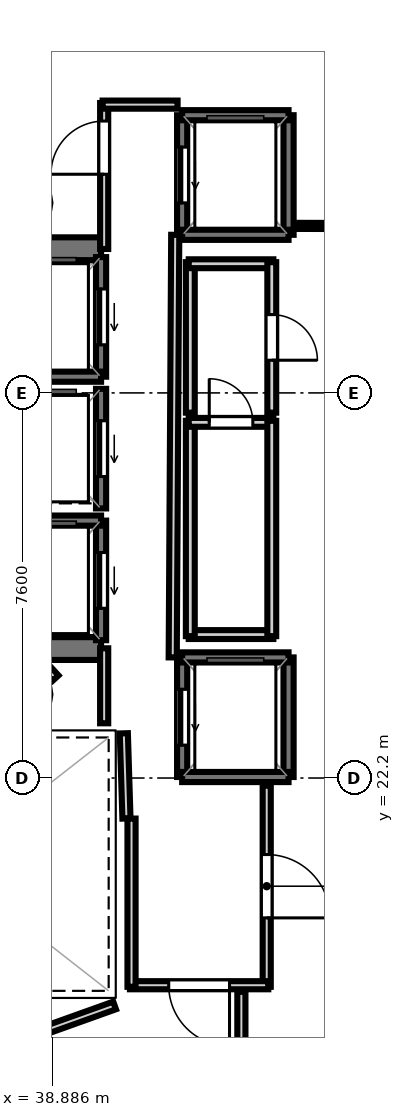
"""IFC4 building model, lengths in metres.
Left out: names, types, materials, properties, quantities, classifications, styles, units other than length and angle.
Written with IfcOpenShell. Run it as: python <this file> out.ifc"""

import sys

from ifc_helpers import new_model, si_unit, direction, frame, frame_2d, origin, place, context, subcontext, project, spatial, rectangle, extrude, element, fill, save


model = new_model("IFC4")
c1 = context("Model", 3, precision=1e-05, world=origin(), true_north=direction((0.0, 1.0)))
c2 = subcontext(c1, "Body", "Model", "MODEL_VIEW")
j1 = project(units=[si_unit("LENGTHUNIT", "METRE"), si_unit("PLANEANGLEUNIT", "RADIAN")], contexts=[c1])
p1 = place(None, origin())
s1 = spatial("IfcSite", under=j1, at=p1, CompositionType="ELEMENT")
p2 = place(p1, origin())
s2 = spatial("IfcBuilding", under=s1, at=p2, CompositionType="ELEMENT")
p3 = place(p2, frame((0.0, 0.0, 317.6)))
s3 = spatial("IfcBuildingStorey", under=s2, at=p3, CompositionType="ELEMENT", Elevation=317.6)
p4 = place(p3, frame((29.33, 32.645, 0.0), z_axis=(0.0, 0.0, 1.0), x_axis=(1.0, 0.0, 0.0)))
e1 = element("IfcWall", 1, at=p4, inside=s3, PredefinedType="SHEAR", context=c2, shape_type="SweptSolid", body=[
    extrude(rectangle(XDim=10.52, YDim=0.45, at=frame_2d((5.26, 0.0))), origin(), (0.0, 0.0, 1.0), 3.4),
])
p5 = place(p4, frame((0.895, 0.0, 0.0)))
e2 = element("IfcOpeningElement", 2, at=p5, cuts=e1, PredefinedType="OPENING", context=c2, shape_type="SweptSolid", body=[
    extrude(rectangle(XDim=1.25, YDim=2.15, at=frame_2d((0.625, 1.075))), frame((0.0, 0.235, 0.0), z_axis=(0.0, -1.0, 0.0), x_axis=(1.0, 0.0, 0.0)), (0.0, 0.0, 1.0), 0.47),
])
p6 = place(p3, frame((29.33, 24.755, 0.0), z_axis=(0.0, 0.0, 1.0), x_axis=(1.0, 0.0, 0.0)))
e3 = element("IfcWall", 3, at=p6, inside=s3, PredefinedType="SHEAR", context=c2, shape_type="SweptSolid", body=[
    extrude(rectangle(XDim=10.52, YDim=0.45, at=frame_2d((5.26, 0.0))), origin(), (0.0, 0.0, 1.0), 3.4),
])
p7 = place(p6, frame((0.695, 0.0, 0.0)))
e4 = element("IfcOpeningElement", 4, at=p7, cuts=e3, PredefinedType="OPENING", context=c2, shape_type="SweptSolid", body=[
    extrude(rectangle(XDim=1.25, YDim=2.15, at=frame_2d((0.625, 1.075))), frame((0.0, 0.235, 0.0), z_axis=(0.0, -1.0, 0.0), x_axis=(1.0, 0.0, 0.0)), (0.0, 0.0, 1.0), 0.47),
])
p8 = place(p3, frame((39.85, 30.12, 0.0), z_axis=(0.0, 0.0, 1.0), x_axis=(0.0, 1.0, 0.0)))
e5 = element("IfcWall", 5, at=p8, inside=s3, PredefinedType="SOLIDWALL", context=c2, shape_type="SweptSolid", body=[
    extrude(rectangle(XDim=2.36, YDim=0.2, at=frame_2d((1.18, 0.0))), origin(), (0.0, 0.0, 1.0), 3.4),
])
p9 = place(p8, frame((0.63, 0.0, 0.0)))
e6 = element("IfcOpeningElement", 6, at=p9, cuts=e5, PredefinedType="OPENING", context=c2, shape_type="SweptSolid", body=[
    extrude(rectangle(XDim=1.1, YDim=2.15, at=frame_2d((0.55, 1.075))), frame((0.0, 0.11, 0.0), z_axis=(0.0, -1.0, 0.0), x_axis=(1.0, 0.0, 0.0)), (0.0, 0.0, 1.0), 0.22),
])
p10 = place(p3, frame((37.75, 30.12, 0.0), z_axis=(0.0, 0.0, 1.0), x_axis=(1.0, 0.0, 0.0)))
e7 = element("IfcWall", 7, at=p10, inside=s3, PredefinedType="SOLIDWALL", context=c2, shape_type="SweptSolid", body=[
    extrude(rectangle(XDim=2.1, YDim=0.2, at=frame_2d((1.05, 0.0))), origin(), (0.0, 0.0, 1.0), 3.4),
])
p11 = place(p3, frame((39.85, 24.92, 0.0), z_axis=(0.0, 0.0, 1.0), x_axis=(0.0, 1.0, 0.0)))
e8 = element("IfcWall", 8, at=p11, inside=s3, PredefinedType="SOLIDWALL", context=c2, shape_type="SweptSolid", body=[
    extrude(rectangle(XDim=2.36, YDim=0.2, at=frame_2d((1.18, 0.0))), origin(), (0.0, 0.0, 1.0), 3.4),
])
p12 = place(p11, frame((0.63, 0.0, 0.0)))
e9 = element("IfcOpeningElement", 9, at=p12, cuts=e8, PredefinedType="OPENING", context=c2, shape_type="SweptSolid", body=[
    extrude(rectangle(XDim=1.1, YDim=2.15, at=frame_2d((0.55, 1.075))), frame((0.0, 0.11, 0.0), z_axis=(0.0, -1.0, 0.0), x_axis=(1.0, 0.0, 0.0)), (0.0, 0.0, 1.0), 0.22),
])
p13 = place(p3, frame((37.75, 27.28, 0.0), z_axis=(0.0, 0.0, 1.0), x_axis=(1.0, 0.0, 0.0)))
e10 = element("IfcWall", 10, at=p13, inside=s3, PredefinedType="SOLIDWALL", context=c2, shape_type="SweptSolid", body=[
    extrude(rectangle(XDim=2.1, YDim=0.2, at=frame_2d((1.05, 0.0))), origin(), (0.0, 0.0, 1.0), 3.4),
])
p14 = place(p3, frame((39.85, 27.52, 0.0), z_axis=(0.0, 0.0, 1.0), x_axis=(0.0, 1.0, 0.0)))
e11 = element("IfcWall", 11, at=p14, inside=s3, PredefinedType="SOLIDWALL", context=c2, shape_type="SweptSolid", body=[
    extrude(rectangle(XDim=2.36, YDim=0.2, at=frame_2d((1.18, 0.0))), origin(), (0.0, 0.0, 1.0), 3.4),
])
p15 = place(p14, frame((0.63, 0.0, 0.0)))
e12 = element("IfcOpeningElement", 12, at=p15, cuts=e11, PredefinedType="OPENING", context=c2, shape_type="SweptSolid", body=[
    extrude(rectangle(XDim=1.1, YDim=2.15, at=frame_2d((0.55, 1.075))), frame((0.0, 0.11, 0.0), z_axis=(0.0, -1.0, 0.0), x_axis=(1.0, 0.0, 0.0)), (0.0, 0.0, 1.0), 0.22),
])
p16 = place(p3, frame((43.55, 22.22, 0.0), z_axis=(0.0, 0.0, 1.0), x_axis=(0.0, 1.0, 0.0)))
e13 = element("IfcWall", 13, at=p16, inside=s3, PredefinedType="SOLIDWALL", context=c2, shape_type="SweptSolid", body=[
    extrude(rectangle(XDim=2.36, YDim=0.2, at=frame_2d((1.18, 0.0))), origin(), (0.0, 0.0, 1.0), 3.4),
])
p17 = place(p3, frame((41.45, 22.22, 0.0), z_axis=(0.0, 0.0, 1.0), x_axis=(0.0, 1.0, 0.0)))
e14 = element("IfcWall", 14, at=p17, inside=s3, PredefinedType="SOLIDWALL", context=c2, shape_type="SweptSolid", body=[
    extrude(rectangle(XDim=2.36, YDim=0.2, at=frame_2d((1.18, 0.0))), origin(), (0.0, 0.0, 1.0), 3.4),
])
p18 = place(p17, frame((0.63, 0.0, 0.0)))
e15 = element("IfcOpeningElement", 15, at=p18, cuts=e14, PredefinedType="OPENING", context=c2, shape_type="SweptSolid", body=[
    extrude(rectangle(XDim=1.1, YDim=2.15, at=frame_2d((0.55, 1.075))), frame((0.0, 0.11, 0.0), z_axis=(0.0, -1.0, 0.0), x_axis=(1.0, 0.0, 0.0)), (0.0, 0.0, 1.0), 0.22),
])
for number, where, z_axis, x_axis in (
    (16, (41.45, 24.58, 0.0), (0.0, 0.0, 1.0), (1.0, 0.0, 0.0)),
    (17, (41.45, 22.22, 0.0), (0.0, 0.0, 1.0), (1.0, 0.0, 0.0)),
):
    element("IfcWall", number, at=place(p3, frame(where, z_axis=z_axis, x_axis=x_axis)), inside=s3, PredefinedType="SOLIDWALL", context=c2, shape_type="SweptSolid", body=[
        extrude(rectangle(XDim=2.1, YDim=0.2, at=frame_2d((1.05, 0.0))), origin(), (0.0, 0.0, 1.0), 3.4),
    ])
p19 = place(p3, frame((43.55, 32.92, 0.0), z_axis=(0.0, 0.0, 1.0), x_axis=(0.0, 1.0, 0.0)))
e18 = element("IfcWall", 18, at=p19, inside=s3, PredefinedType="SOLIDWALL", context=c2, shape_type="SweptSolid", body=[
    extrude(rectangle(XDim=2.36, YDim=0.2, at=frame_2d((1.18, 0.0))), origin(), (0.0, 0.0, 1.0), 3.4),
])
p20 = place(p3, frame((41.45, 32.92, 0.0), z_axis=(0.0, 0.0, 1.0), x_axis=(0.0, 1.0, 0.0)))
e19 = element("IfcWall", 19, at=p20, inside=s3, PredefinedType="SOLIDWALL", context=c2, shape_type="SweptSolid", body=[
    extrude(rectangle(XDim=2.36, YDim=0.2, at=frame_2d((1.18, 0.0))), origin(), (0.0, 0.0, 1.0), 3.4),
])
p21 = place(p20, frame((0.63, 0.0, 0.0)))
e20 = element("IfcOpeningElement", 20, at=p21, cuts=e19, PredefinedType="OPENING", context=c2, shape_type="SweptSolid", body=[
    extrude(rectangle(XDim=1.1, YDim=2.15, at=frame_2d((0.55, 1.075))), frame((0.0, 0.11, 0.0), z_axis=(0.0, -1.0, 0.0), x_axis=(1.0, 0.0, 0.0)), (0.0, 0.0, 1.0), 0.22),
])
for number, where, z_axis, x_axis in (
    (21, (41.45, 35.28, 0.0), (0.0, 0.0, 1.0), (1.0, 0.0, 0.0)),
    (22, (41.45, 32.92, 0.0), (0.0, 0.0, 1.0), (1.0, 0.0, 0.0)),
):
    element("IfcWall", number, at=place(p3, frame(where, z_axis=z_axis, x_axis=x_axis)), inside=s3, PredefinedType="SOLIDWALL", context=c2, shape_type="SweptSolid", body=[
        extrude(rectangle(XDim=2.1, YDim=0.2, at=frame_2d((1.05, 0.0))), origin(), (0.0, 0.0, 1.0), 3.4),
    ])
p22 = place(p3, frame((40.351, 21.401, 0.0), z_axis=(0.0, 0.0, 1.0), x_axis=(-0.031058045979, 0.999517582527, 0.0)))
e23 = element("IfcWall", 23, at=p22, inside=s3, PredefinedType="PARTITIONING", context=c2, shape_type="SweptSolid", body=[
    extrude(rectangle(XDim=1.682, YDim=0.16, at=frame_2d((0.841, 0.0))), origin(), (0.0, 0.0, 1.0), 2.72),
])
p23 = place(p3, frame((39.911, 23.28, 0.0), z_axis=(0.0, 0.0, 1.0), x_axis=(0.0, 1.0, 0.0)))
e24 = element("IfcWall", 24, at=p23, inside=s3, PredefinedType="PARTITIONING", context=c2, shape_type="SweptSolid", body=[
    extrude(rectangle(XDim=1.48, YDim=0.16, at=frame_2d((0.74, 0.0))), origin(), (0.0, 0.0, 1.0), 2.72),
])
p24 = place(p3, frame((39.911, 32.64, 0.0), z_axis=(0.0, 0.0, 1.0), x_axis=(0.0, 1.0, 0.0)))
e25 = element("IfcWall", 25, at=p24, inside=s3, PredefinedType="PARTITIONING", context=c2, shape_type="SweptSolid", body=[
    extrude(rectangle(XDim=2.88, YDim=0.16, at=frame_2d((1.44, 0.0))), origin(), (0.0, 0.0, 1.0), 2.72),
])
p25 = place(p24, frame((1.475, 0.0, 0.0)))
e26 = element("IfcOpeningElement", 26, at=p25, cuts=e25, PredefinedType="OPENING", context=c2, shape_type="SweptSolid", body=[
    extrude(rectangle(XDim=1.05, YDim=2.15, at=frame_2d((0.525, 1.075))), frame((0.0, 0.09, 0.0), z_axis=(0.0, -1.0, 0.0), x_axis=(1.0, 0.0, 0.0)), (0.0, 0.0, 1.0), 0.18),
])
p26 = place(p3, frame((39.88, 35.489, 0.0), z_axis=(0.0, 0.0, 1.0), x_axis=(1.0, 0.0, 0.0)))
e27 = element("IfcWall", 27, at=p26, inside=s3, PredefinedType="PARTITIONING", context=c2, shape_type="SweptSolid", body=[
    extrude(rectangle(XDim=1.48, YDim=0.16, at=frame_2d((0.74, 0.0))), origin(), (0.0, 0.0, 1.0), 2.72),
])
p27 = place(p3, frame((41.313, 32.92, 0.0), z_axis=(0.0, 0.0, 1.0), x_axis=(-0.005942518022, -0.999982343084, 0.0)))
e28 = element("IfcWall", 28, at=p27, inside=s3, PredefinedType="PARTITIONING", context=c2, shape_type="SweptSolid", body=[
    extrude(rectangle(XDim=8.34, YDim=0.16, at=frame_2d((4.17, 0.0))), origin(), (0.0, 0.0, 1.0), 2.72),
])
p28 = place(p3, frame((43.119, 22.05, 0.0), z_axis=(0.0, 0.0, 1.0), x_axis=(0.0, -1.0, 0.0)))
e29 = element("IfcWall", 29, at=p28, inside=s3, PredefinedType="PARTITIONING", context=c2, shape_type="SweptSolid", body=[
    extrude(rectangle(XDim=3.97, YDim=0.16, at=frame_2d((1.985, 0.0))), origin(), (0.0, 0.0, 1.0), 2.72),
])
p29 = place(p28, frame((1.36, 0.0, 0.0)))
e30 = element("IfcOpeningElement", 30, at=p29, cuts=e29, PredefinedType="OPENING", context=c2, shape_type="SweptSolid", body=[
    extrude(rectangle(XDim=1.25, YDim=2.2, at=frame_2d((0.625, 1.1))), frame((0.0, 0.09, 0.0), z_axis=(0.0, -1.0, 0.0), x_axis=(1.0, 0.0, 0.0)), (0.0, 0.0, 1.0), 0.18),
])
p30 = place(p3, frame((43.15, 18.111, 0.0), z_axis=(0.0, 0.0, 1.0), x_axis=(-1.0, 0.0, 0.0)))
e31 = element("IfcWall", 31, at=p30, inside=s3, PredefinedType="PARTITIONING", context=c2, shape_type="SweptSolid", body=[
    extrude(rectangle(XDim=2.73, YDim=0.16, at=frame_2d((1.365, 0.0))), origin(), (0.0, 0.0, 1.0), 2.72),
])
p31 = place(p30, frame((0.765, 0.0, 0.0)))
e32 = element("IfcOpeningElement", 32, at=p31, cuts=e31, PredefinedType="OPENING", context=c2, shape_type="SweptSolid", body=[
    extrude(rectangle(XDim=1.2, YDim=2.15, at=frame_2d((0.6, 1.075))), frame((0.0, 0.09, 0.0), z_axis=(0.0, -1.0, 0.0), x_axis=(1.0, 0.0, 0.0)), (0.0, 0.0, 1.0), 0.18),
])
p32 = place(p3, frame((40.451, 18.08, 0.0), z_axis=(0.0, 0.0, 1.0), x_axis=(0.0, 1.0, 0.0)))
e33 = element("IfcWall", 33, at=p32, inside=s3, PredefinedType="PARTITIONING", context=c2, shape_type="SweptSolid", body=[
    extrude(rectangle(XDim=3.32, YDim=0.16, at=frame_2d((1.66, 0.0))), origin(), (0.0, 0.0, 1.0), 2.72),
])
p33 = place(p3, frame((43.25, 25.031, 0.0), z_axis=(0.0, 0.0, 1.0), x_axis=(-1.0, 0.0, 0.0)))
e34 = element("IfcWall", 34, at=p33, inside=s3, PredefinedType="PLUMBINGWALL", context=c2, shape_type="SweptSolid", body=[
    extrude(rectangle(XDim=1.67, YDim=0.175, at=frame_2d((0.835, 0.0))), origin(), (0.0, 0.0, 1.0), 2.72),
])
p34 = place(p3, frame((41.611, 25.0, 0.0), z_axis=(0.0, 0.0, 1.0), x_axis=(0.0, 1.0, 0.0)))
e35 = element("IfcWall", 35, at=p34, inside=s3, PredefinedType="PLUMBINGWALL", context=c2, shape_type="SweptSolid", body=[
    extrude(rectangle(XDim=4.25, YDim=0.175, at=frame_2d((2.125, 0.0))), origin(), (0.0, 0.0, 1.0), 2.72),
])
p35 = place(p3, frame((41.58, 29.219, 0.0), z_axis=(0.0, 0.0, 1.0), x_axis=(1.0, 0.0, 0.0)))
e36 = element("IfcWall", 36, at=p35, inside=s3, PredefinedType="PLUMBINGWALL", context=c2, shape_type="SweptSolid", body=[
    extrude(rectangle(XDim=1.67, YDim=0.175, at=frame_2d((0.835, 0.0))), origin(), (0.0, 0.0, 1.0), 2.72),
])
p36 = place(p35, frame((0.405, 0.0, 0.0)))
e37 = element("IfcOpeningElement", 37, at=p36, cuts=e36, PredefinedType="OPENING", context=c2, shape_type="SweptSolid", body=[
    extrude(rectangle(XDim=0.86, YDim=2.05, at=frame_2d((0.43, 1.025))), frame((0.0, 0.097, 0.0), z_axis=(0.0, -1.0, 0.0), x_axis=(1.0, 0.0, 0.0)), (0.0, 0.0, 1.0), 0.195),
])
p37 = place(p3, frame((43.219, 29.25, 0.0), z_axis=(0.0, 0.0, 1.0), x_axis=(0.0, -1.0, 0.0)))
e38 = element("IfcWall", 38, at=p37, inside=s3, PredefinedType="PLUMBINGWALL", context=c2, shape_type="SweptSolid", body=[
    extrude(rectangle(XDim=4.25, YDim=0.175, at=frame_2d((2.125, 0.0))), origin(), (0.0, 0.0, 1.0), 2.72),
])
p38 = place(p3, frame((41.611, 29.41, 0.0), z_axis=(0.0, 0.0, 1.0), x_axis=(0.0, 1.0, 0.0)))
e39 = element("IfcWall", 39, at=p38, inside=s3, PredefinedType="PLUMBINGWALL", context=c2, shape_type="SweptSolid", body=[
    extrude(rectangle(XDim=2.97, YDim=0.175, at=frame_2d((1.485, 0.0))), origin(), (0.0, 0.0, 1.0), 2.72),
])
p39 = place(p3, frame((41.58, 32.349, 0.0), z_axis=(0.0, 0.0, 1.0), x_axis=(1.0, 0.0, 0.0)))
e40 = element("IfcWall", 40, at=p39, inside=s3, PredefinedType="PLUMBINGWALL", context=c2, shape_type="SweptSolid", body=[
    extrude(rectangle(XDim=1.67, YDim=0.175, at=frame_2d((0.835, 0.0))), origin(), (0.0, 0.0, 1.0), 2.72),
])
p40 = place(p3, frame((43.219, 32.38, 0.0), z_axis=(0.0, 0.0, 1.0), x_axis=(0.0, -1.0, 0.0)))
e41 = element("IfcWall", 41, at=p40, inside=s3, PredefinedType="PLUMBINGWALL", context=c2, shape_type="SweptSolid", body=[
    extrude(rectangle(XDim=2.97, YDim=0.175, at=frame_2d((1.485, 0.0))), origin(), (0.0, 0.0, 1.0), 2.72),
])
p41 = place(p40, frame((1.035, 0.0, 0.0)))
e42 = element("IfcOpeningElement", 42, at=p41, cuts=e41, PredefinedType="OPENING", context=c2, shape_type="SweptSolid", body=[
    extrude(rectangle(XDim=0.9, YDim=2.1, at=frame_2d((0.45, 1.05))), frame((0.0, 0.097, 0.0), z_axis=(0.0, -1.0, 0.0), x_axis=(1.0, 0.0, 0.0)), (0.0, 0.0, 1.0), 0.195),
])
p42 = place(p3, frame((38.951, 24.171, 0.0), z_axis=(0.0, 0.0, 1.0), x_axis=(-0.674186852077, 0.738560822469, 0.0)))
e43 = element("IfcWall", 43, at=p42, inside=s3, PredefinedType="PARTITIONING", context=c2, shape_type="SweptSolid", body=[
    extrude(rectangle(XDim=0.281, YDim=0.16, at=frame_2d((0.14, 0.0))), origin(), (0.0, 0.0, 1.0), 2.72),
])
p43 = place(p3, frame((36.81, 16.529, 0.0), z_axis=(0.0, 0.0, 1.0), x_axis=(0.941548344365, 0.33687789364, 0.0)))
e44 = element("IfcWall", 44, at=p43, inside=s3, PredefinedType="PARTITIONING", context=c2, shape_type="SweptSolid", body=[
    extrude(rectangle(XDim=3.513, YDim=0.16, at=frame_2d((1.756, 0.0))), origin(), (0.0, 0.0, 1.0), 2.72),
])
p44 = place(p3, frame((42.619, 17.98, 0.0), z_axis=(0.0, 0.0, 1.0), x_axis=(0.0, -1.0, 0.0)))
e45 = element("IfcWall", 45, at=p44, inside=s3, PredefinedType="PARTITIONING", context=c2, shape_type="SweptSolid", body=[
    extrude(rectangle(XDim=1.93, YDim=0.16, at=frame_2d((0.965, 0.0))), origin(), (0.0, 0.0, 1.0), 2.72),
])
p45 = place(p3, frame((43.72, 33.096, 0.0), z_axis=(0.0, 0.0, 1.0), x_axis=(0.999997687984, -0.0021503548, 0.0)))
e46 = element("IfcWall", 46, at=p45, inside=s3, PredefinedType="PARTITIONING", context=c2, shape_type="SweptSolid", body=[
    extrude(rectangle(XDim=8.856, YDim=0.12, at=frame_2d((4.428, 0.0))), origin(), (0.0, 0.0, 1.0), 2.72),
])
p46 = place(p3, frame((46.577, 21.093, 0.0), z_axis=(0.0, 0.0, 1.0), x_axis=(-0.446654549511, -0.894706495674, 0.0)))
e47 = element("IfcWall", 47, at=p46, inside=s3, PredefinedType="PARTITIONING", context=c2, shape_type="SweptSolid", body=[
    extrude(rectangle(XDim=15.724, YDim=0.105, at=frame_2d((7.862, 0.0))), origin(), (0.0, 0.0, 1.0), 2.72),
])
p47 = place(p9, origin())
e48 = element("IfcDoor", 48, at=p47, inside=s3, OperationType="SLIDING_TO_LEFT", PredefinedType="DOOR", context=c2, shape_type="SweptSolid", body=[
    extrude(rectangle(XDim=1.1, YDim=2.15, at=frame_2d((0.55, 1.075))), frame((0.0, 0.025, 0.0), z_axis=(0.0, -1.0, 0.0), x_axis=(1.0, 0.0, 0.0)), (0.0, 0.0, 1.0), 0.05),
])
fill(e6, e48)
p48 = place(p12, origin())
e49 = element("IfcDoor", 49, at=p48, inside=s3, OperationType="SLIDING_TO_LEFT", PredefinedType="DOOR", context=c2, shape_type="SweptSolid", body=[
    extrude(rectangle(XDim=1.1, YDim=2.15, at=frame_2d((0.55, 1.075))), frame((0.0, 0.025, 0.0), z_axis=(0.0, -1.0, 0.0), x_axis=(1.0, 0.0, 0.0)), (0.0, 0.0, 1.0), 0.05),
])
fill(e9, e49)
p49 = place(p15, origin())
e50 = element("IfcDoor", 50, at=p49, inside=s3, OperationType="SLIDING_TO_LEFT", PredefinedType="DOOR", context=c2, shape_type="SweptSolid", body=[
    extrude(rectangle(XDim=1.1, YDim=2.15, at=frame_2d((0.55, 1.075))), frame((0.0, 0.025, 0.0), z_axis=(0.0, -1.0, 0.0), x_axis=(1.0, 0.0, 0.0)), (0.0, 0.0, 1.0), 0.05),
])
fill(e12, e50)
p50 = place(p18, origin())
e51 = element("IfcDoor", 51, at=p50, inside=s3, OperationType="SLIDING_TO_LEFT", PredefinedType="DOOR", context=c2, shape_type="SweptSolid", body=[
    extrude(rectangle(XDim=1.1, YDim=2.15, at=frame_2d((0.55, 1.075))), frame((0.0, 0.025, 0.0), z_axis=(0.0, -1.0, 0.0), x_axis=(1.0, 0.0, 0.0)), (0.0, 0.0, 1.0), 0.05),
])
fill(e15, e51)
p51 = place(p21, origin())
e52 = element("IfcDoor", 52, at=p51, inside=s3, OperationType="SLIDING_TO_LEFT", PredefinedType="DOOR", context=c2, shape_type="SweptSolid", body=[
    extrude(rectangle(XDim=1.1, YDim=2.15, at=frame_2d((0.55, 1.075))), frame((0.0, 0.025, 0.0), z_axis=(0.0, -1.0, 0.0), x_axis=(1.0, 0.0, 0.0)), (0.0, 0.0, 1.0), 0.05),
])
fill(e20, e52)
p52 = place(p31, origin())
e53 = element("IfcDoor", 53, at=p52, inside=s3, OperationType="SINGLE_SWING_LEFT", PredefinedType="DOOR", context=c2, shape_type="SweptSolid", body=[
    extrude(rectangle(XDim=1.2, YDim=2.15, at=frame_2d((0.6, 1.075))), frame((0.0, 0.025, 0.0), z_axis=(0.0, -1.0, 0.0), x_axis=(1.0, 0.0, 0.0)), (0.0, 0.0, 1.0), 0.05),
])
fill(e32, e53)
p53 = place(p29, origin())
e54 = element("IfcDoor", 54, at=p53, inside=s3, OperationType="SINGLE_SWING_RIGHT", PredefinedType="DOOR", context=c2, shape_type="SweptSolid", body=[
    extrude(rectangle(XDim=1.25, YDim=2.2, at=frame_2d((0.625, 1.1))), frame((0.0, 0.025, 0.0), z_axis=(0.0, -1.0, 0.0), x_axis=(1.0, 0.0, 0.0)), (0.0, 0.0, 1.0), 0.05),
])
fill(e30, e54)
p54 = place(p25, origin())
e55 = element("IfcDoor", 55, at=p54, inside=s3, OperationType="SINGLE_SWING_LEFT", PredefinedType="DOOR", context=c2, shape_type="SweptSolid", body=[
    extrude(rectangle(XDim=1.05, YDim=2.15, at=frame_2d((0.525, 1.075))), frame((0.0, 0.025, 0.0), z_axis=(0.0, -1.0, 0.0), x_axis=(1.0, 0.0, 0.0)), (0.0, 0.0, 1.0), 0.05),
])
fill(e26, e55)
p55 = place(p41, origin())
e56 = element("IfcDoor", 56, at=p55, inside=s3, OperationType="SINGLE_SWING_RIGHT", PredefinedType="DOOR", context=c2, shape_type="SweptSolid", body=[
    extrude(rectangle(XDim=0.9, YDim=2.1, at=frame_2d((0.45, 1.05))), frame((0.0, 0.025, 0.0), z_axis=(0.0, -1.0, 0.0), x_axis=(1.0, 0.0, 0.0)), (0.0, 0.0, 1.0), 0.05),
])
fill(e42, e56)
p56 = place(p36, origin())
e57 = element("IfcDoor", 57, at=p56, inside=s3, OperationType="SINGLE_SWING_LEFT", PredefinedType="DOOR", context=c2, shape_type="SweptSolid", body=[
    extrude(rectangle(XDim=0.86, YDim=2.05, at=frame_2d((0.43, 1.025))), frame((0.0, 0.025, 0.0), z_axis=(0.0, -1.0, 0.0), x_axis=(1.0, 0.0, 0.0)), (0.0, 0.0, 1.0), 0.05),
])
fill(e37, e57)
save(model, sys.argv[1])
